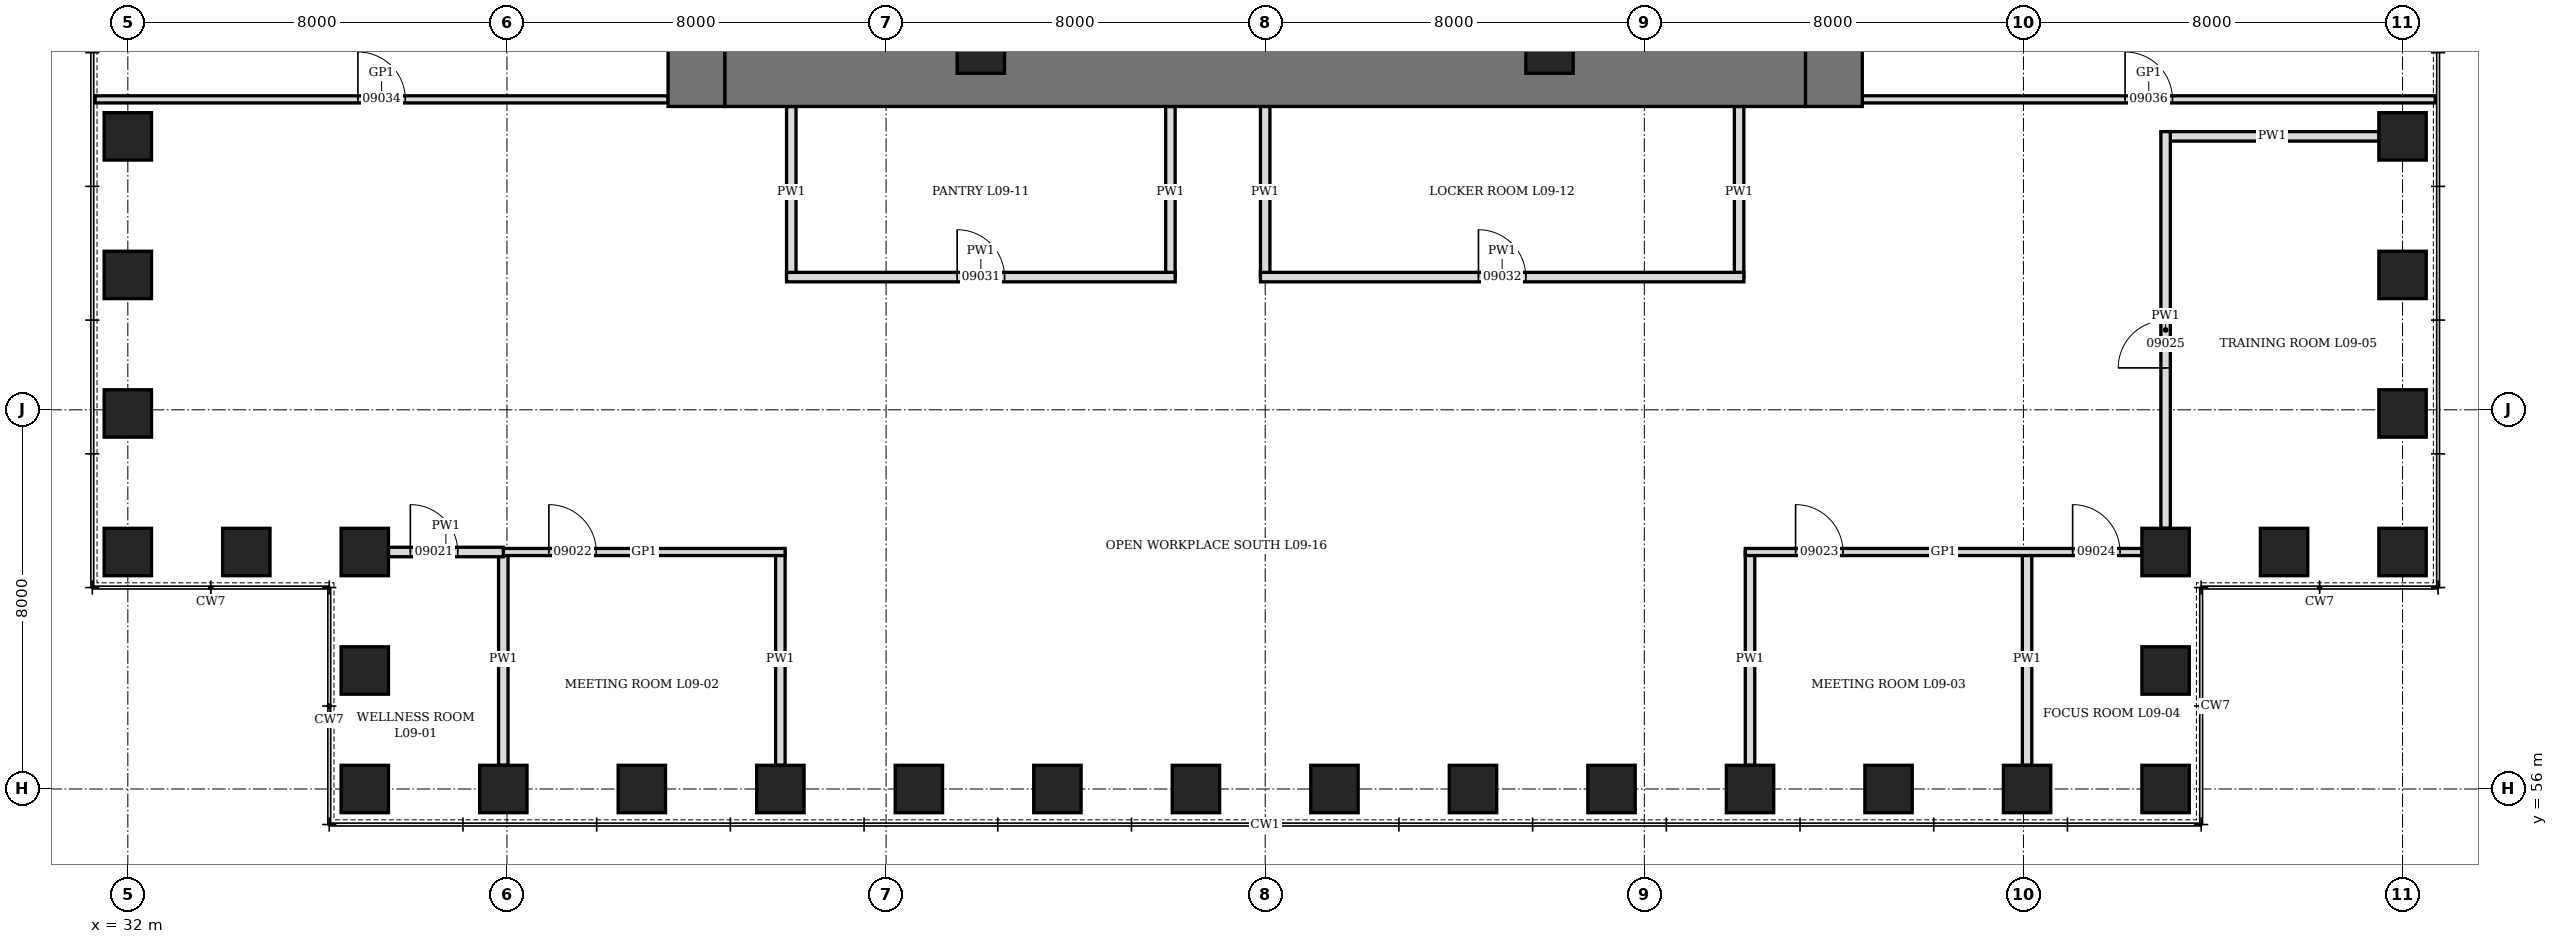
"""IFC4 building model, lengths in metres.
Left out: names, types, materials, properties, quantities, classifications, styles, units other than length and angle.
Written with IfcOpenShell. Run it as: python <this file> out.ifc"""

import sys

from ifc_helpers import new_model, si_unit, direction, frame, frame_2d, origin, origin_2d, place, context, subcontext, project, spatial, rectangle, hollow_rectangle, extrude, element, fill, save


model = new_model("IFC4")
c1 = context("Model", 3, precision=1e-05, world=origin(), true_north=direction((0.0, 1.0)))
c2 = subcontext(c1, "Body", "Model", "MODEL_VIEW")
j1 = project(units=[si_unit("LENGTHUNIT", "METRE"), si_unit("PLANEANGLEUNIT", "RADIAN")], contexts=[c1])
p1 = place(None, origin())
s1 = spatial("IfcSite", under=j1, at=p1, CompositionType="ELEMENT")
p2 = place(p1, origin())
s2 = spatial("IfcBuilding", under=s1, at=p2, CompositionType="ELEMENT")
p3 = place(p2, frame((0.0, 0.0, 47.5)))
s3 = spatial("IfcBuildingStorey", under=s2, at=p3, CompositionType="ELEMENT", Elevation=47.5)
for number, where, z_axis, x_axis in (
    (1, (37.0, 56.0, 0.0), (0.0, 0.0, 1.0), (1.0, 0.0, 0.0)),
    (2, (39.923, 56.0, 0.0), (0.0, 0.0, 1.0), (1.0, 0.0, 0.0)),
    (3, (42.846, 56.0, 0.0), (0.0, 0.0, 1.0), (1.0, 0.0, 0.0)),
    (4, (45.769, 56.0, 0.0), (0.0, 0.0, 1.0), (1.0, 0.0, 0.0)),
    (5, (48.692, 56.0, 0.0), (0.0, 0.0, 1.0), (1.0, 0.0, 0.0)),
    (6, (51.615, 56.0, 0.0), (0.0, 0.0, 1.0), (1.0, 0.0, 0.0)),
    (7, (54.539, 56.0, 0.0), (0.0, 0.0, 1.0), (1.0, 0.0, 0.0)),
    (8, (57.461, 56.0, 0.0), (0.0, 0.0, 1.0), (1.0, 0.0, 0.0)),
    (9, (60.385, 56.0, 0.0), (0.0, 0.0, 1.0), (1.0, 0.0, 0.0)),
    (10, (63.308, 56.0, 0.0), (0.0, 0.0, 1.0), (1.0, 0.0, 0.0)),
    (11, (66.231, 56.0, 0.0), (0.0, 0.0, 1.0), (1.0, 0.0, 0.0)),
    (12, (69.154, 56.0, 0.0), (0.0, 0.0, 1.0), (1.0, 0.0, 0.0)),
    (13, (72.077, 56.0, 0.0), (0.0, 0.0, 1.0), (1.0, 0.0, 0.0)),
    (14, (75.0, 56.0, 0.0), (0.0, 0.0, 1.0), (0.0, 1.0, 0.0)),
    (15, (75.0, 58.5, 0.0), (0.0, 0.0, 1.0), (0.0, 1.0, 0.0)),
    (16, (75.0, 61.0, 0.0), (0.0, 0.0, 1.0), (1.0, 0.0, 0.0)),
    (17, (77.5, 61.0, 0.0), (0.0, 0.0, 1.0), (1.0, 0.0, 0.0)),
    (18, (80.0, 61.0, 0.0), (0.0, 0.0, 1.0), (0.0, 1.0, 0.0)),
    (19, (80.0, 63.923, 0.0), (0.0, 0.0, 1.0), (0.0, 1.0, 0.0)),
    (20, (80.0, 66.846, 0.0), (0.0, 0.0, 1.0), (0.0, 1.0, 0.0)),
    (21, (80.0, 69.769, 0.0), (0.0, 0.0, 1.0), (0.0, 1.0, 0.0)),
    (22, (32.0, 69.769, 0.0), (0.0, 0.0, 1.0), (0.0, 1.0, 0.0)),
    (23, (32.0, 66.846, 0.0), (0.0, 0.0, 1.0), (0.0, 1.0, 0.0)),
    (24, (32.0, 63.923, 0.0), (0.0, 0.0, 1.0), (0.0, 1.0, 0.0)),
    (25, (32.0, 61.0, 0.0), (0.0, 0.0, 1.0), (1.0, 0.0, 0.0)),
    (26, (34.5, 61.0, 0.0), (0.0, 0.0, 1.0), (1.0, 0.0, 0.0)),
    (27, (37.0, 61.0, 0.0), (0.0, 0.0, 1.0), (0.0, 1.0, 0.0)),
    (28, (37.0, 58.5, 0.0), (0.0, 0.0, 1.0), (0.0, 1.0, 0.0)),
):
    element("IfcColumn", number, at=place(p3, frame(where, z_axis=z_axis, x_axis=x_axis)), inside=s3, PredefinedType="COLUMN", context=c2, shape_type="SweptSolid", body=[
        extrude(hollow_rectangle(XDim=1.0, YDim=1.0, WallThickness=0.25, at=origin_2d()), origin(), (0.0, 0.0, 1.0), 4.2),
    ])
p4 = place(p3, frame((44.0, 70.4, 0.0), z_axis=(0.0, 0.0, 1.0), x_axis=(0.0, 1.0, 0.0)))
e29 = element("IfcWall", 29, at=p4, inside=s3, PredefinedType="SHEAR", context=c2, shape_type="SweptSolid", body=[
    extrude(rectangle(XDim=19.2, YDim=1.2, at=frame_2d((9.6, 0.0))), origin(), (0.0, 0.0, 1.0), 4.2),
])
p5 = place(p4, frame((8.6, 0.0, 0.0)))
e30 = element("IfcOpeningElement", 30, at=p5, cuts=e29, PredefinedType="OPENING", context=c2, shape_type="SweptSolid", body=[
    extrude(rectangle(XDim=2.0, YDim=2.4, at=frame_2d((1.0, 1.2))), frame((0.0, 0.61, 0.0), z_axis=(0.0, -1.0, 0.0), x_axis=(1.0, 0.0, 0.0)), (0.0, 0.0, 1.0), 1.22),
])
p6 = place(p3, frame((68.0, 70.4, 0.0), z_axis=(0.0, 0.0, 1.0), x_axis=(0.0, 1.0, 0.0)))
e31 = element("IfcWall", 31, at=p6, inside=s3, PredefinedType="SHEAR", context=c2, shape_type="SweptSolid", body=[
    extrude(rectangle(XDim=19.2, YDim=1.2, at=frame_2d((9.6, 0.0))), origin(), (0.0, 0.0, 1.0), 4.2),
])
p7 = place(p6, frame((8.6, 0.0, 0.0)))
e32 = element("IfcOpeningElement", 32, at=p7, cuts=e31, PredefinedType="OPENING", context=c2, shape_type="SweptSolid", body=[
    extrude(rectangle(XDim=2.0, YDim=2.4, at=frame_2d((1.0, 1.2))), frame((0.0, 0.61, 0.0), z_axis=(0.0, -1.0, 0.0), x_axis=(1.0, 0.0, 0.0)), (0.0, 0.0, 1.0), 1.22),
])
p8 = place(p3, frame((44.6, 71.0, 0.0), z_axis=(0.0, 0.0, 1.0), x_axis=(1.0, 0.0, 0.0)))
e33 = element("IfcWall", 33, at=p8, inside=s3, PredefinedType="SHEAR", context=c2, shape_type="SweptSolid", body=[
    extrude(rectangle(XDim=22.8, YDim=1.2, at=frame_2d((11.4, 0.0))), origin(), (0.0, 0.0, 1.0), 4.2),
])
for number, where, z_axis, x_axis in (
    (34, (50.0, 71.6, 0.0), (0.0, 0.0, 1.0), (1.0, 0.0, 0.0)),
    (35, (62.0, 71.6, 0.0), (0.0, 0.0, 1.0), (1.0, 0.0, 0.0)),
):
    element("IfcColumn", number, at=place(p3, frame(where, z_axis=z_axis, x_axis=x_axis)), inside=s3, PredefinedType="COLUMN", context=c2, shape_type="SweptSolid", body=[
        extrude(hollow_rectangle(XDim=1.0, YDim=1.0, WallThickness=0.15, at=origin_2d()), origin(), (0.0, 0.0, 1.0), 4.2),
    ])
p9 = place(p3, frame((39.923, 56.5, 0.0), z_axis=(0.0, 0.0, 1.0), x_axis=(0.0, 1.0, 0.0)))
e36 = element("IfcWall", 36, at=p9, inside=s3, PredefinedType="PARTITIONING", context=c2, shape_type="SweptSolid", body=[
    extrude(rectangle(XDim=4.5, YDim=0.2, at=frame_2d((2.25, 0.0))), origin(), (0.0, 0.0, 1.0), 3.428),
])
for number, where, z_axis, x_axis in (
    (37, (45.769, 56.5, 0.0), (0.0, 0.0, 1.0), (0.0, 1.0, 0.0)),
    (38, (66.231, 56.5, 0.0), (0.0, 0.0, 1.0), (0.0, 1.0, 0.0)),
):
    element("IfcWall", number, at=place(p3, frame(where, z_axis=z_axis, x_axis=x_axis)), inside=s3, PredefinedType="PARTITIONING", context=c2, shape_type="SweptSolid", body=[
        extrude(rectangle(XDim=4.5, YDim=0.2, at=frame_2d((2.25, 0.0))), origin(), (0.0, 0.0, 1.0), 3.278),
    ])
for number, where, z_axis, x_axis in (
    (39, (72.077, 56.5, 0.0), (0.0, 0.0, 1.0), (0.0, 1.0, 0.0)),
    (40, (75.0, 69.769, 0.0), (0.0, 0.0, 1.0), (1.0, 0.0, 0.0)),
):
    element("IfcWall", number, at=place(p3, frame(where, z_axis=z_axis, x_axis=x_axis)), inside=s3, PredefinedType="PARTITIONING", context=c2, shape_type="SweptSolid", body=[
        extrude(rectangle(XDim=4.5, YDim=0.2, at=frame_2d((2.25, 0.0))), origin(), (0.0, 0.0, 1.0), 3.428),
    ])
for number, where, z_axis, x_axis in (
    (41, (46.0, 66.8, 0.0), (0.0, 0.0, 1.0), (0.0, 1.0, 0.0)),
    (42, (54.0, 66.8, 0.0), (0.0, 0.0, 1.0), (0.0, 1.0, 0.0)),
    (43, (56.0, 66.8, 0.0), (0.0, 0.0, 1.0), (0.0, 1.0, 0.0)),
    (44, (66.0, 66.8, 0.0), (0.0, 0.0, 1.0), (0.0, 1.0, 0.0)),
):
    element("IfcWall", number, at=place(p3, frame(where, z_axis=z_axis, x_axis=x_axis)), inside=s3, PredefinedType="PARTITIONING", context=c2, shape_type="SweptSolid", body=[
        extrude(rectangle(XDim=3.6, YDim=0.2, at=frame_2d((1.8, 0.0))), origin(), (0.0, 0.0, 1.0), 4.04),
    ])
p10 = place(p3, frame((39.923, 61.0, 0.0), z_axis=(0.0, 0.0, 1.0), x_axis=(1.0, 0.0, 0.0)))
e45 = element("IfcWall", 45, at=p10, inside=s3, PredefinedType="PARTITIONING", context=c2, shape_type="SweptSolid", body=[
    extrude(rectangle(XDim=5.946, YDim=0.15, at=frame_2d((2.973, 0.0))), origin(), (0.0, 0.0, 1.0), 4.04),
])
p11 = place(p10, frame((0.961, 0.0, 0.0)))
e46 = element("IfcOpeningElement", 46, at=p11, cuts=e45, PredefinedType="OPENING", context=c2, shape_type="SweptSolid", body=[
    extrude(rectangle(XDim=1.0, YDim=2.4, at=frame_2d((0.5, 1.2))), frame((0.0, 0.085, 0.0), z_axis=(0.0, -1.0, 0.0), x_axis=(1.0, 0.0, 0.0)), (0.0, 0.0, 1.0), 0.17),
])
p12 = place(p3, frame((66.131, 61.0, 0.0), z_axis=(0.0, 0.0, 1.0), x_axis=(1.0, 0.0, 0.0)))
e47 = element("IfcWall", 47, at=p12, inside=s3, PredefinedType="PARTITIONING", context=c2, shape_type="SweptSolid", body=[
    extrude(rectangle(XDim=8.369, YDim=0.15, at=frame_2d((4.185, 0.0))), origin(), (0.0, 0.0, 1.0), 4.04),
])
p13 = place(p12, frame((1.062, 0.0, 0.0)))
e48 = element("IfcOpeningElement", 48, at=p13, cuts=e47, PredefinedType="OPENING", context=c2, shape_type="SweptSolid", body=[
    extrude(rectangle(XDim=1.0, YDim=2.4, at=frame_2d((0.5, 1.2))), frame((0.0, 0.085, 0.0), z_axis=(0.0, -1.0, 0.0), x_axis=(1.0, 0.0, 0.0)), (0.0, 0.0, 1.0), 0.17),
])
p14 = place(p12, frame((6.908, 0.0, 0.0)))
e49 = element("IfcOpeningElement", 49, at=p14, cuts=e47, PredefinedType="OPENING", context=c2, shape_type="SweptSolid", body=[
    extrude(rectangle(XDim=1.0, YDim=2.4, at=frame_2d((0.5, 1.2))), frame((0.0, 0.085, 0.0), z_axis=(0.0, -1.0, 0.0), x_axis=(1.0, 0.0, 0.0)), (0.0, 0.0, 1.0), 0.17),
])
p15 = place(p3, frame((37.5, 61.0, 0.0), z_axis=(0.0, 0.0, 1.0), x_axis=(1.0, 0.0, 0.0)))
e50 = element("IfcWall", 50, at=p15, inside=s3, PredefinedType="PARTITIONING", context=c2, shape_type="SweptSolid", body=[
    extrude(rectangle(XDim=2.423, YDim=0.2, at=frame_2d((1.211, 0.0))), origin(), (0.0, 0.0, 1.0), 4.04),
])
p16 = place(p15, frame((0.461, 0.0, 0.0)))
e51 = element("IfcOpeningElement", 51, at=p16, cuts=e50, PredefinedType="OPENING", context=c2, shape_type="SweptSolid", body=[
    extrude(rectangle(XDim=1.0, YDim=2.1, at=frame_2d((0.5, 1.05))), frame((0.0, 0.11, 0.0), z_axis=(0.0, -1.0, 0.0), x_axis=(1.0, 0.0, 0.0)), (0.0, 0.0, 1.0), 0.22),
])
p17 = place(p3, frame((45.9, 66.8, 0.0), z_axis=(0.0, 0.0, 1.0), x_axis=(1.0, 0.0, 0.0)))
e52 = element("IfcWall", 52, at=p17, inside=s3, PredefinedType="PARTITIONING", context=c2, shape_type="SweptSolid", body=[
    extrude(rectangle(XDim=8.2, YDim=0.2, at=frame_2d((4.1, 0.0))), origin(), (0.0, 0.0, 1.0), 4.04),
])
p18 = place(p17, frame((3.6, 0.0, 0.0)))
e53 = element("IfcOpeningElement", 53, at=p18, cuts=e52, PredefinedType="OPENING", context=c2, shape_type="SweptSolid", body=[
    extrude(rectangle(XDim=1.0, YDim=2.1, at=frame_2d((0.5, 1.05))), frame((0.0, 0.11, 0.0), z_axis=(0.0, -1.0, 0.0), x_axis=(1.0, 0.0, 0.0)), (0.0, 0.0, 1.0), 0.22),
])
p19 = place(p3, frame((55.9, 66.8, 0.0), z_axis=(0.0, 0.0, 1.0), x_axis=(1.0, 0.0, 0.0)))
e54 = element("IfcWall", 54, at=p19, inside=s3, PredefinedType="PARTITIONING", context=c2, shape_type="SweptSolid", body=[
    extrude(rectangle(XDim=10.2, YDim=0.2, at=frame_2d((5.1, 0.0))), origin(), (0.0, 0.0, 1.0), 4.04),
])
p20 = place(p19, frame((4.6, 0.0, 0.0)))
e55 = element("IfcOpeningElement", 55, at=p20, cuts=e54, PredefinedType="OPENING", context=c2, shape_type="SweptSolid", body=[
    extrude(rectangle(XDim=1.0, YDim=2.1, at=frame_2d((0.5, 1.05))), frame((0.0, 0.11, 0.0), z_axis=(0.0, -1.0, 0.0), x_axis=(1.0, 0.0, 0.0)), (0.0, 0.0, 1.0), 0.22),
])
p21 = place(p3, frame((31.31, 70.55, 0.0), z_axis=(0.0, 0.0, 1.0), x_axis=(1.0, 0.0, 0.0)))
e56 = element("IfcWall", 56, at=p21, inside=s3, PredefinedType="PARTITIONING", context=c2, shape_type="SweptSolid", body=[
    extrude(rectangle(XDim=12.09, YDim=0.15, at=frame_2d((6.045, 0.0))), origin(), (0.0, 0.0, 1.0), 4.04),
])
p22 = place(p21, frame((5.545, 0.0, 0.0)))
e57 = element("IfcOpeningElement", 57, at=p22, cuts=e56, PredefinedType="OPENING", context=c2, shape_type="SweptSolid", body=[
    extrude(rectangle(XDim=1.0, YDim=2.4, at=frame_2d((0.5, 1.2))), frame((0.0, 0.085, 0.0), z_axis=(0.0, -1.0, 0.0), x_axis=(1.0, 0.0, 0.0)), (0.0, 0.0, 1.0), 0.17),
])
p23 = place(p3, frame((68.6, 70.55, 0.0), z_axis=(0.0, 0.0, 1.0), x_axis=(1.0, 0.0, 0.0)))
e58 = element("IfcWall", 58, at=p23, inside=s3, PredefinedType="PARTITIONING", context=c2, shape_type="SweptSolid", body=[
    extrude(rectangle(XDim=12.09, YDim=0.15, at=frame_2d((6.045, 0.0))), origin(), (0.0, 0.0, 1.0), 4.04),
])
p24 = place(p23, frame((5.545, 0.0, 0.0)))
e59 = element("IfcOpeningElement", 59, at=p24, cuts=e58, PredefinedType="OPENING", context=c2, shape_type="SweptSolid", body=[
    extrude(rectangle(XDim=1.0, YDim=2.4, at=frame_2d((0.5, 1.2))), frame((0.0, 0.085, 0.0), z_axis=(0.0, -1.0, 0.0), x_axis=(1.0, 0.0, 0.0)), (0.0, 0.0, 1.0), 0.17),
])
p25 = place(p3, frame((75.0, 61.5, 0.0), z_axis=(0.0, 0.0, 1.0), x_axis=(0.0, 1.0, 0.0)))
e60 = element("IfcWall", 60, at=p25, inside=s3, PredefinedType="PARTITIONING", context=c2, shape_type="SweptSolid", body=[
    extrude(rectangle(XDim=8.369, YDim=0.2, at=frame_2d((4.185, 0.0))), origin(), (0.0, 0.0, 1.0), 4.04),
])
p26 = place(p25, frame((3.385, 0.0, 0.0)))
e61 = element("IfcOpeningElement", 61, at=p26, cuts=e60, PredefinedType="OPENING", context=c2, shape_type="SweptSolid", body=[
    extrude(rectangle(XDim=1.0, YDim=2.1, at=frame_2d((0.5, 1.05))), frame((0.0, 0.11, 0.0), z_axis=(0.0, -1.0, 0.0), x_axis=(1.0, 0.0, 0.0)), (0.0, 0.0, 1.0), 0.22),
])
p27 = place(p16, origin())
e62 = element("IfcDoor", 62, at=p27, inside=s3, OperationType="SINGLE_SWING_LEFT", PredefinedType="DOOR", context=c2, shape_type="SweptSolid", body=[
    extrude(rectangle(XDim=1.0, YDim=2.1, at=frame_2d((0.5, 1.05))), frame((0.0, 0.1, 0.0), z_axis=(0.0, -1.0, 0.0), x_axis=(1.0, 0.0, 0.0)), (0.0, 0.0, 1.0), 0.199),
])
fill(e51, e62)
p28 = place(p11, origin())
e63 = element("IfcDoor", 63, at=p28, inside=s3, OperationType="SINGLE_SWING_RIGHT", PredefinedType="DOOR", context=c2, shape_type="SweptSolid", body=[
    extrude(rectangle(XDim=1.0, YDim=2.4, at=frame_2d((0.5, 1.2))), frame((0.0, 0.075, 0.0), z_axis=(0.0, -1.0, 0.0), x_axis=(1.0, 0.0, 0.0)), (0.0, 0.0, 1.0), 0.149),
])
fill(e46, e63)
p29 = place(p13, origin())
e64 = element("IfcDoor", 64, at=p29, inside=s3, OperationType="SINGLE_SWING_RIGHT", PredefinedType="DOOR", context=c2, shape_type="SweptSolid", body=[
    extrude(rectangle(XDim=1.0, YDim=2.4, at=frame_2d((0.5, 1.2))), frame((0.0, 0.075, 0.0), z_axis=(0.0, -1.0, 0.0), x_axis=(1.0, 0.0, 0.0)), (0.0, 0.0, 1.0), 0.149),
])
fill(e48, e64)
p30 = place(p14, origin())
e65 = element("IfcDoor", 65, at=p30, inside=s3, OperationType="SINGLE_SWING_RIGHT", PredefinedType="DOOR", context=c2, shape_type="SweptSolid", body=[
    extrude(rectangle(XDim=1.0, YDim=2.4, at=frame_2d((0.5, 1.2))), frame((0.0, 0.075, 0.0), z_axis=(0.0, -1.0, 0.0), x_axis=(1.0, 0.0, 0.0)), (0.0, 0.0, 1.0), 0.149),
])
fill(e49, e65)
p31 = place(p26, origin())
e66 = element("IfcDoor", 66, at=p31, inside=s3, OperationType="SINGLE_SWING_LEFT", PredefinedType="DOOR", context=c2, shape_type="SweptSolid", body=[
    extrude(rectangle(XDim=1.0, YDim=2.1, at=frame_2d((0.5, 1.05))), frame((0.0, 0.1, 0.0), z_axis=(0.0, -1.0, 0.0), x_axis=(1.0, 0.0, 0.0)), (0.0, 0.0, 1.0), 0.199),
])
fill(e61, e66)
p32 = place(p18, origin())
e67 = element("IfcDoor", 67, at=p32, inside=s3, OperationType="SINGLE_SWING_LEFT", PredefinedType="DOOR", context=c2, shape_type="SweptSolid", body=[
    extrude(rectangle(XDim=1.0, YDim=2.1, at=frame_2d((0.5, 1.05))), frame((0.0, 0.1, 0.0), z_axis=(0.0, -1.0, 0.0), x_axis=(1.0, 0.0, 0.0)), (0.0, 0.0, 1.0), 0.199),
])
fill(e53, e67)
p33 = place(p20, origin())
e68 = element("IfcDoor", 68, at=p33, inside=s3, OperationType="SINGLE_SWING_LEFT", PredefinedType="DOOR", context=c2, shape_type="SweptSolid", body=[
    extrude(rectangle(XDim=1.0, YDim=2.1, at=frame_2d((0.5, 1.05))), frame((0.0, 0.1, 0.0), z_axis=(0.0, -1.0, 0.0), x_axis=(1.0, 0.0, 0.0)), (0.0, 0.0, 1.0), 0.199),
])
fill(e55, e68)
p34 = place(p22, origin())
e69 = element("IfcDoor", 69, at=p34, inside=s3, OperationType="SINGLE_SWING_RIGHT", PredefinedType="DOOR", context=c2, shape_type="SweptSolid", body=[
    extrude(rectangle(XDim=1.0, YDim=2.4, at=frame_2d((0.5, 1.2))), frame((0.0, 0.075, 0.0), z_axis=(0.0, -1.0, 0.0), x_axis=(1.0, 0.0, 0.0)), (0.0, 0.0, 1.0), 0.149),
])
fill(e57, e69)
p35 = place(p24, origin())
e70 = element("IfcDoor", 70, at=p35, inside=s3, OperationType="SINGLE_SWING_RIGHT", PredefinedType="DOOR", context=c2, shape_type="SweptSolid", body=[
    extrude(rectangle(XDim=1.0, YDim=2.4, at=frame_2d((0.5, 1.2))), frame((0.0, 0.075, 0.0), z_axis=(0.0, -1.0, 0.0), x_axis=(1.0, 0.0, 0.0)), (0.0, 0.0, 1.0), 0.149),
])
fill(e59, e70)
save(model, sys.argv[1])
